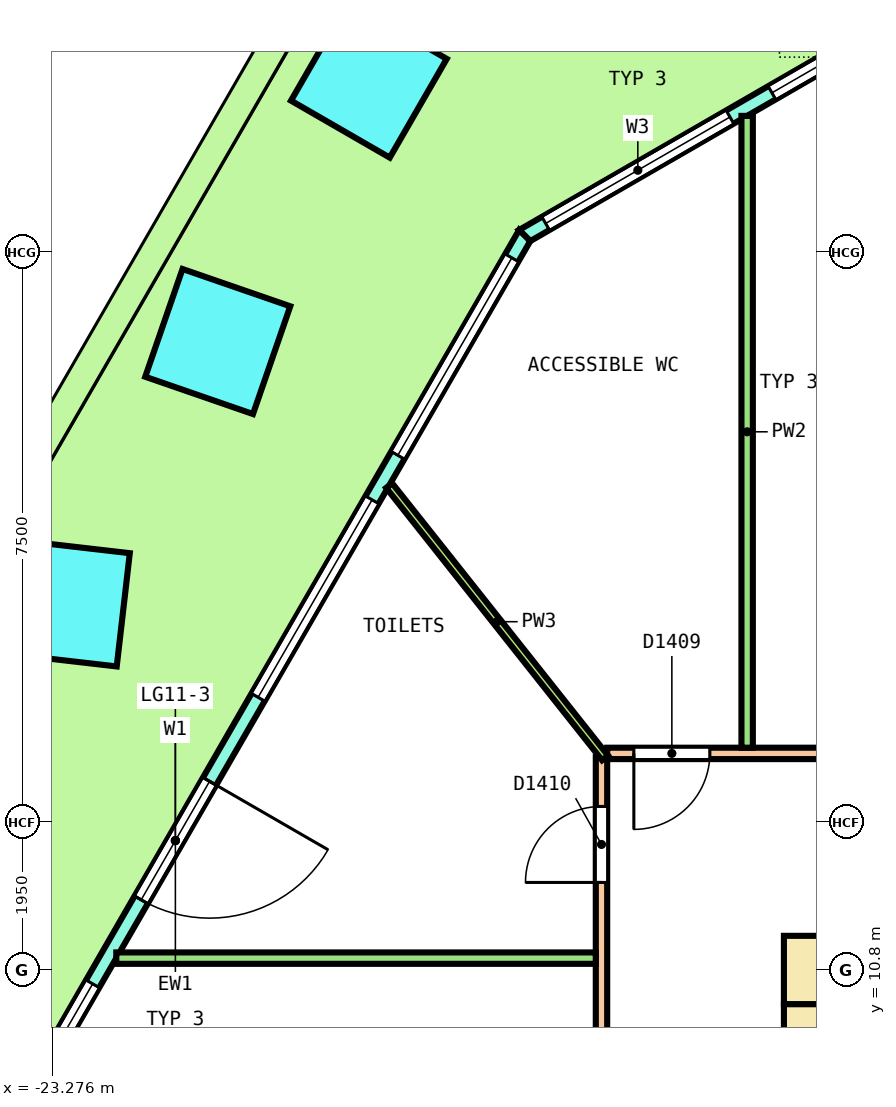
"""IFC4 building model, lengths in metres.
Left out: names, types, materials, properties, quantities, classifications, styles, units other than length and angle.
Written with IfcOpenShell. Run it as: python <this file> out.ifc"""

import sys

from ifc_helpers import new_model, si_unit, direction, frame, frame_2d, origin, origin_2d, place, context, subcontext, project, spatial, polyline, rectangle, outline, extrude, element, fill, save


model = new_model("IFC4")
c1 = context("Model", 3, precision=1e-05, world=origin(), true_north=direction((0.0, 1.0)))
c2 = subcontext(c1, "Body", "Model", "MODEL_VIEW")
j1 = project(units=[si_unit("LENGTHUNIT", "METRE"), si_unit("PLANEANGLEUNIT", "RADIAN")], contexts=[c1])
p1 = place(None, origin())
s1 = spatial("IfcSite", under=j1, at=p1, CompositionType="ELEMENT")
p2 = place(p1, origin())
s2 = spatial("IfcBuilding", under=s1, at=p2, CompositionType="ELEMENT")
p3 = place(p2, frame((0.0, 0.0, 49.8)))
s3 = spatial("IfcBuildingStorey", under=s2, at=p3, CompositionType="ELEMENT", Elevation=49.8)
p4 = place(p3, frame((-19.11, 22.512, 0.0), z_axis=(-0.036205074038, 0.0, 0.999344381389), x_axis=(-0.499425957592, -0.866167613071, -0.018093616283)))
e1 = element("IfcColumn", 1, at=p4, inside=s3, PredefinedType="COLUMN", context=c2, shape_type="SweptSolid", body=[
    extrude(rectangle(XDim=1.5, YDim=1.5, at=origin_2d()), origin(), (0.0, 0.0, 1.0), 4.053),
])
p5 = place(p3, frame((-21.098, 19.069, 0.0), z_axis=(-0.032654174822, 0.006325993277, 0.999446690262), x_axis=(-0.500478631698, -0.865680616164, -0.010872442804)))
e2 = element("IfcColumn", 2, at=p5, inside=s3, PredefinedType="COLUMN", context=c2, shape_type="SweptSolid", body=[
    extrude(rectangle(XDim=1.5, YDim=1.5, at=origin_2d()), origin(), (0.0, 0.0, 1.0), 4.052),
])
p6 = place(p3, frame((-23.087, 15.625, 0.0), z_axis=(-0.028980660531, 0.012532177527, 0.999501408624), x_axis=(-0.499450496938, -0.866334867635, -0.003619147421)))
e3 = element("IfcColumn", 3, at=p6, inside=s3, PredefinedType="COLUMN", context=c2, shape_type="SweptSolid", body=[
    extrude(rectangle(XDim=1.5, YDim=1.5, at=origin_2d()), origin(), (0.0, 0.0, 1.0), 4.052),
])
p7 = place(p3, frame((-11.107, 23.9, 0.0), z_axis=(0.0, 0.0, 1.0), x_axis=(-0.866029458321, -0.49999297727, 0.0)))
e4 = element("IfcWall", 4, at=p7, inside=s3, PredefinedType="SOLIDWALL", context=c2, shape_type="SweptSolid", body=[
    extrude(outline(polyline([(-0.027, -0.1), (1.128, -0.1), (2.282, -0.1), (3.437, -0.1), (4.592, -0.1), (5.747, -0.1), (6.901, -0.1), (6.848, 0.1), (5.711, 0.1), (4.574, 0.1), (3.437, 0.1), (2.301, 0.1), (1.164, 0.1), (0.027, 0.1), (-0.027, -0.1)])), origin(), (0.0, 0.0, 1.0), 4.1),
])
p8 = place(p7, frame((0.319, 0.0, 0.1)))
e5 = element("IfcOpeningElement", 5, at=p8, cuts=e4, PredefinedType="OPENING", context=c2, shape_type="SweptSolid", body=[
    extrude(rectangle(XDim=2.8, YDim=2.9, at=frame_2d((1.4, 1.45))), frame((0.0, 0.11, 0.0), z_axis=(0.0, -1.0, 0.0), x_axis=(1.0, 0.0, 0.0)), (0.0, 0.0, 1.0), 0.22),
])
p9 = place(p7, frame((3.756, 0.0, 0.1)))
e6 = element("IfcOpeningElement", 6, at=p9, cuts=e4, PredefinedType="OPENING", context=c2, shape_type="SweptSolid", body=[
    extrude(rectangle(XDim=2.8, YDim=2.9, at=frame_2d((1.4, 1.45))), frame((0.0, 0.11, 0.0), z_axis=(0.0, -1.0, 0.0), x_axis=(1.0, 0.0, 0.0)), (0.0, 0.0, 1.0), 0.22),
])
p10 = place(p3, frame((-17.061, 20.463, 0.0), z_axis=(0.0, 0.0, 1.0), x_axis=(-0.499998761798, -0.866026118659, 0.0)))
e7 = element("IfcWall", 7, at=p10, inside=s3, PredefinedType="SOLIDWALL", context=c2, shape_type="SweptSolid", body=[
    extrude(outline(polyline([(-0.027, -0.1), (0.997, -0.1), (2.021, -0.1), (3.046, -0.1), (4.07, -0.1), (5.094, -0.1), (6.118, -0.1), (7.143, -0.1), (8.167, -0.1), (9.191, -0.1), (10.215, -0.1), (11.239, -0.1), (12.263, -0.1), (13.288, -0.1), (14.312, -0.1), (15.336, -0.1), (16.36, -0.1), (17.385, -0.1), (18.409, -0.1), (18.355, 0.1), (17.337, 0.1), (16.319, 0.1), (15.3, 0.1), (14.282, 0.1), (13.264, 0.1), (12.246, 0.1), (11.227, 0.1), (10.209, 0.1), (9.191, 0.1), (8.173, 0.1), (7.155, 0.1), (6.136, 0.1), (5.118, 0.1), (4.1, 0.1), (3.082, 0.1), (2.063, 0.1), (1.045, 0.1), (0.027, 0.1), (-0.027, -0.1)])), origin(), (0.0, 0.0, 1.0), 4.1),
])
p11 = place(p10, frame((0.338, 0.0, 0.1)))
e8 = element("IfcOpeningElement", 8, at=p11, cuts=e7, PredefinedType="OPENING", context=c2, shape_type="SweptSolid", body=[
    extrude(rectangle(XDim=3.0, YDim=2.9, at=frame_2d((1.5, 1.45))), frame((0.0, 0.11, 0.0), z_axis=(0.0, -1.0, 0.0), x_axis=(1.0, 0.0, 0.0)), (0.0, 0.0, 1.0), 0.22),
])
p12 = place(p10, frame((4.015, 0.0, 0.1)))
e9 = element("IfcOpeningElement", 9, at=p12, cuts=e7, PredefinedType="OPENING", context=c2, shape_type="SweptSolid", body=[
    extrude(rectangle(XDim=3.0, YDim=2.9, at=frame_2d((1.5, 1.45))), frame((0.0, 0.11, 0.0), z_axis=(0.0, -1.0, 0.0), x_axis=(1.0, 0.0, 0.0)), (0.0, 0.0, 1.0), 0.22),
])
p13 = place(p10, frame((8.291, 0.0, 0.0)))
e10 = element("IfcOpeningElement", 10, at=p13, cuts=e7, PredefinedType="OPENING", context=c2, shape_type="SweptSolid", body=[
    extrude(rectangle(XDim=1.8, YDim=2.4, at=frame_2d((0.9, 1.2))), frame((0.0, 0.11, 0.0), z_axis=(0.0, -1.0, 0.0), x_axis=(1.0, 0.0, 0.0)), (0.0, 0.0, 1.0), 0.22),
])
p14 = place(p10, frame((8.291, 0.0, 2.55)))
e11 = element("IfcOpeningElement", 11, at=p14, cuts=e7, PredefinedType="OPENING", context=c2, shape_type="SweptSolid", body=[
    extrude(rectangle(XDim=1.8, YDim=0.45, at=frame_2d((0.9, 0.225))), frame((0.0, 0.11, 0.0), z_axis=(0.0, -1.0, 0.0), x_axis=(1.0, 0.0, 0.0)), (0.0, 0.0, 1.0), 0.22),
])
p15 = place(p10, frame((11.367, 0.0, 0.1)))
e12 = element("IfcOpeningElement", 12, at=p15, cuts=e7, PredefinedType="OPENING", context=c2, shape_type="SweptSolid", body=[
    extrude(rectangle(XDim=3.0, YDim=2.9, at=frame_2d((1.5, 1.45))), frame((0.0, 0.11, 0.0), z_axis=(0.0, -1.0, 0.0), x_axis=(1.0, 0.0, 0.0)), (0.0, 0.0, 1.0), 0.22),
])
p16 = place(p10, frame((15.044, 0.0, 0.1)))
e13 = element("IfcOpeningElement", 13, at=p16, cuts=e7, PredefinedType="OPENING", context=c2, shape_type="SweptSolid", body=[
    extrude(rectangle(XDim=3.0, YDim=2.9, at=frame_2d((1.5, 1.45))), frame((0.0, 0.11, 0.0), z_axis=(0.0, -1.0, 0.0), x_axis=(1.0, 0.0, 0.0)), (0.0, 0.0, 1.0), 0.22),
])
p17 = place(p3, frame((-13.65, 10.8, 0.0), z_axis=(0.0, 0.0, 1.0), x_axis=(1.0, 0.0, 0.0)))
e14 = element("IfcWall", 14, at=p17, inside=s3, PredefinedType="SHEAR", context=c2, shape_type="SweptSolid", body=[
    extrude(rectangle(XDim=27.3, YDim=0.9, at=frame_2d((13.65, 0.0))), origin(), (0.0, 0.0, 1.0), 4.1),
])
p18 = place(p17, frame((2.4, 0.0, 0.0)))
e15 = element("IfcOpeningElement", 15, at=p18, cuts=e14, PredefinedType="OPENING", context=c2, shape_type="SweptSolid", body=[
    extrude(rectangle(XDim=1.0, YDim=2.1, at=frame_2d((0.5, 1.05))), frame((0.0, 0.46, 0.0), z_axis=(0.0, -1.0, 0.0), x_axis=(1.0, 0.0, 0.0)), (0.0, 0.0, 1.0), 0.92),
])
p19 = place(p17, frame((6.494, 0.0, 0.0)))
e16 = element("IfcOpeningElement", 16, at=p19, cuts=e14, PredefinedType="OPENING", context=c2, shape_type="SweptSolid", body=[
    extrude(rectangle(XDim=1.0, YDim=2.1, at=frame_2d((0.5, 1.05))), frame((0.0, 0.46, 0.0), z_axis=(0.0, -1.0, 0.0), x_axis=(1.0, 0.0, 0.0)), (0.0, 0.0, 1.0), 0.92),
])
p20 = place(p17, frame((10.556, 0.0, 0.0)))
e17 = element("IfcOpeningElement", 17, at=p20, cuts=e14, PredefinedType="OPENING", context=c2, shape_type="SweptSolid", body=[
    extrude(rectangle(XDim=1.0, YDim=2.1, at=frame_2d((0.5, 1.05))), frame((0.0, 0.46, 0.0), z_axis=(0.0, -1.0, 0.0), x_axis=(1.0, 0.0, 0.0)), (0.0, 0.0, 1.0), 0.92),
])
p21 = place(p17, frame((18.077, 0.0, 0.0)))
e18 = element("IfcOpeningElement", 18, at=p21, cuts=e14, PredefinedType="OPENING", context=c2, shape_type="SweptSolid", body=[
    extrude(rectangle(XDim=1.0, YDim=2.1, at=frame_2d((0.5, 1.05))), frame((0.0, 0.46, 0.0), z_axis=(0.0, -1.0, 0.0), x_axis=(1.0, 0.0, 0.0)), (0.0, 0.0, 1.0), 0.92),
])
p22 = place(p17, frame((21.206, 0.0, 0.0)))
e19 = element("IfcOpeningElement", 19, at=p22, cuts=e14, PredefinedType="OPENING", context=c2, shape_type="SweptSolid", body=[
    extrude(rectangle(XDim=1.0, YDim=2.1, at=frame_2d((0.5, 1.05))), frame((0.0, 0.46, 0.0), z_axis=(0.0, -1.0, 0.0), x_axis=(1.0, 0.0, 0.0)), (0.0, 0.0, 1.0), 0.92),
])
p23 = place(p17, frame((24.367, 0.0, 0.0)))
e20 = element("IfcOpeningElement", 20, at=p23, cuts=e14, PredefinedType="OPENING", context=c2, shape_type="SweptSolid", body=[
    extrude(rectangle(XDim=1.0, YDim=2.1, at=frame_2d((0.5, 1.05))), frame((0.0, 0.46, 0.0), z_axis=(0.0, -1.0, 0.0), x_axis=(1.0, 0.0, 0.0)), (0.0, 0.0, 1.0), 0.92),
])
p24 = place(p17, frame((14.575, 0.0, 0.0)))
e21 = element("IfcOpeningElement", 21, at=p24, cuts=e14, PredefinedType="OPENING", context=c2, shape_type="SweptSolid", body=[
    extrude(rectangle(XDim=1.4, YDim=2.1, at=frame_2d((0.7, 1.05))), frame((0.0, 0.46, 0.0), z_axis=(0.0, -1.0, 0.0), x_axis=(1.0, 0.0, 0.0)), (0.0, 0.0, 1.0), 0.92),
])
p25 = place(p3, frame((-13.2, -10.35, 0.0), z_axis=(0.0, 0.0, 1.0), x_axis=(0.0, 1.0, 0.0)))
e22 = element("IfcWall", 22, at=p25, inside=s3, PredefinedType="SHEAR", context=c2, shape_type="SweptSolid", body=[
    extrude(rectangle(XDim=20.7, YDim=0.9, at=frame_2d((10.35, 0.0))), origin(), (0.0, 0.0, 1.0), 4.1),
])
p26 = place(p25, frame((9.15, 0.0, 0.0)))
e23 = element("IfcOpeningElement", 23, at=p26, cuts=e22, PredefinedType="OPENING", context=c2, shape_type="SweptSolid", body=[
    extrude(rectangle(XDim=2.4, YDim=2.1, at=frame_2d((1.2, 1.05))), frame((0.0, 0.46, 0.0), z_axis=(0.0, -1.0, 0.0), x_axis=(1.0, 0.0, 0.0)), (0.0, 0.0, 1.0), 0.92),
])
p27 = place(p25, frame((16.05, 0.0, 0.0)))
e24 = element("IfcOpeningElement", 24, at=p27, cuts=e22, PredefinedType="OPENING", context=c2, shape_type="SweptSolid", body=[
    extrude(rectangle(XDim=1.2, YDim=2.1, at=frame_2d((0.6, 1.05))), frame((0.0, 0.46, 0.0), z_axis=(0.0, -1.0, 0.0), x_axis=(1.0, 0.0, 0.0)), (0.0, 0.0, 1.0), 0.92),
])
p28 = place(p25, frame((3.45, 0.0, 0.0)))
e25 = element("IfcOpeningElement", 25, at=p28, cuts=e22, PredefinedType="OPENING", context=c2, shape_type="SweptSolid", body=[
    extrude(rectangle(XDim=1.2, YDim=2.1, at=frame_2d((0.6, 1.05))), frame((0.0, 0.46, 0.0), z_axis=(0.0, -1.0, 0.0), x_axis=(1.0, 0.0, 0.0)), (0.0, 0.0, 1.0), 0.92),
])
p29 = place(p3, frame((-15.975, 13.65, 0.0), z_axis=(0.0, 0.0, 1.0), x_axis=(1.0, 0.0, 0.0)))
e26 = element("IfcWall", 26, at=p29, inside=s3, PredefinedType="PARTITIONING", context=c2, shape_type="SweptSolid", body=[
    extrude(rectangle(XDim=31.95, YDim=0.15, at=frame_2d((15.975, 0.0))), origin(), (0.0, 0.0, 1.0), 3.05),
])
p30 = place(p29, frame((28.967, 0.0, 0.0)))
e27 = element("IfcOpeningElement", 27, at=p30, cuts=e26, PredefinedType="OPENING", context=c2, shape_type="SweptSolid", body=[
    extrude(rectangle(XDim=1.2, YDim=2.1, at=frame_2d((0.6, 1.05))), frame((0.0, 0.085, 0.0), z_axis=(0.0, -1.0, 0.0), x_axis=(1.0, 0.0, 0.0)), (0.0, 0.0, 1.0), 0.17),
])
p31 = place(p29, frame((13.623, 0.0, 0.0)))
e28 = element("IfcOpeningElement", 28, at=p31, cuts=e26, PredefinedType="OPENING", context=c2, shape_type="SweptSolid", body=[
    extrude(rectangle(XDim=1.2, YDim=2.1, at=frame_2d((0.6, 1.05))), frame((0.0, 0.085, 0.0), z_axis=(0.0, -1.0, 0.0), x_axis=(1.0, 0.0, 0.0)), (0.0, 0.0, 1.0), 0.17),
])
p32 = place(p29, frame((6.356, 0.0, 0.0)))
e29 = element("IfcOpeningElement", 29, at=p32, cuts=e26, PredefinedType="OPENING", context=c2, shape_type="SweptSolid", body=[
    extrude(rectangle(XDim=1.2, YDim=2.1, at=frame_2d((0.6, 1.05))), frame((0.0, 0.085, 0.0), z_axis=(0.0, -1.0, 0.0), x_axis=(1.0, 0.0, 0.0)), (0.0, 0.0, 1.0), 0.17),
])
p33 = place(p29, frame((0.351, 0.0, 0.0)))
e30 = element("IfcOpeningElement", 30, at=p33, cuts=e26, PredefinedType="OPENING", context=c2, shape_type="SweptSolid", body=[
    extrude(rectangle(XDim=1.0, YDim=2.1, at=frame_2d((0.5, 1.05))), frame((0.0, 0.085, 0.0), z_axis=(0.0, -1.0, 0.0), x_axis=(1.0, 0.0, 0.0)), (0.0, 0.0, 1.0), 0.17),
])
p34 = place(p3, frame((-16.05, -13.575, 0.0), z_axis=(0.0, 0.0, 1.0), x_axis=(0.0, 1.0, 0.0)))
e31 = element("IfcWall", 31, at=p34, inside=s3, PredefinedType="PARTITIONING", context=c2, shape_type="SweptSolid", body=[
    extrude(rectangle(XDim=27.175, YDim=0.15, at=frame_2d((13.587, 0.0))), origin(), (0.0, 0.0, 1.0), 3.05),
])
p35 = place(p34, frame((25.527, 0.0, 0.0)))
e32 = element("IfcOpeningElement", 32, at=p35, cuts=e31, PredefinedType="OPENING", context=c2, shape_type="SweptSolid", body=[
    extrude(rectangle(XDim=1.0, YDim=2.1, at=frame_2d((0.5, 1.05))), frame((0.0, 0.085, 0.0), z_axis=(0.0, -1.0, 0.0), x_axis=(1.0, 0.0, 0.0)), (0.0, 0.0, 1.0), 0.17),
])
p36 = place(p34, frame((18.987, 0.0, 0.0)))
e33 = element("IfcOpeningElement", 33, at=p36, cuts=e31, PredefinedType="OPENING", context=c2, shape_type="SweptSolid", body=[
    extrude(rectangle(XDim=1.2, YDim=2.1, at=frame_2d((0.6, 1.05))), frame((0.0, 0.085, 0.0), z_axis=(0.0, -1.0, 0.0), x_axis=(1.0, 0.0, 0.0)), (0.0, 0.0, 1.0), 0.17),
])
p37 = place(p34, frame((7.319, 0.0, 0.0)))
e34 = element("IfcOpeningElement", 34, at=p37, cuts=e31, PredefinedType="OPENING", context=c2, shape_type="SweptSolid", body=[
    extrude(rectangle(XDim=1.2, YDim=2.1, at=frame_2d((0.6, 1.05))), frame((0.0, 0.085, 0.0), z_axis=(0.0, -1.0, 0.0), x_axis=(1.0, 0.0, 0.0)), (0.0, 0.0, 1.0), 0.17),
])
p38 = place(p3, frame((-14.134, 13.725, 0.0), z_axis=(0.0, 0.0, 1.0), x_axis=(0.0, 1.0, 0.0)))
e35 = element("IfcWall", 35, at=p38, inside=s3, PredefinedType="PARTITIONING", context=c2, shape_type="SweptSolid", body=[
    extrude(rectangle(XDim=8.312, YDim=0.15, at=frame_2d((4.156, 0.0))), origin(), (0.0, 0.0, 1.0), 3.05),
])
p39 = place(p3, frame((-22.433, 10.957, 0.0), z_axis=(0.0, 0.0, 1.0), x_axis=(1.0, 0.0, 0.0)))
e36 = element("IfcWall", 36, at=p39, inside=s3, PredefinedType="PARTITIONING", context=c2, shape_type="SweptSolid", body=[
    extrude(rectangle(XDim=6.308, YDim=0.15, at=frame_2d((3.154, 0.0))), origin(), (0.0, 0.0, 1.0), 3.05),
])
p40 = place(p3, frame((-18.844, 17.174, 0.0), z_axis=(0.0, 0.0, 1.0), x_axis=(0.621211587881, -0.783642879813, 0.0)))
e37 = element("IfcWall", 37, at=p40, inside=s3, PredefinedType="PARTITIONING", context=c2, shape_type="SweptSolid", body=[
    extrude(rectangle(XDim=4.572, YDim=0.1, at=frame_2d((2.286, 0.0))), origin(), (0.0, 0.0, 1.0), 3.05),
])
p41 = place(p8, origin())
e38 = element("IfcWindow", 38, at=p41, inside=s3, PartitioningType="SINGLE_PANEL", PredefinedType="WINDOW", context=c2, shape_type="SweptSolid", body=[
    extrude(rectangle(XDim=2.8, YDim=2.9, at=frame_2d((1.4, 1.45))), frame((0.0, 0.03, 0.0), z_axis=(0.0, -1.0, 0.0), x_axis=(1.0, 0.0, 0.0)), (0.0, 0.0, 1.0), 0.06),
])
fill(e5, e38)
p42 = place(p9, origin())
e39 = element("IfcWindow", 39, at=p42, inside=s3, PartitioningType="SINGLE_PANEL", PredefinedType="WINDOW", context=c2, shape_type="SweptSolid", body=[
    extrude(rectangle(XDim=2.8, YDim=2.9, at=frame_2d((1.4, 1.45))), frame((0.0, 0.03, 0.0), z_axis=(0.0, -1.0, 0.0), x_axis=(1.0, 0.0, 0.0)), (0.0, 0.0, 1.0), 0.06),
])
fill(e6, e39)
p43 = place(p11, origin())
e40 = element("IfcWindow", 40, at=p43, inside=s3, PartitioningType="SINGLE_PANEL", PredefinedType="WINDOW", context=c2, shape_type="SweptSolid", body=[
    extrude(rectangle(XDim=3.0, YDim=2.9, at=frame_2d((1.5, 1.45))), frame((0.0, 0.03, 0.0), z_axis=(0.0, -1.0, 0.0), x_axis=(1.0, 0.0, 0.0)), (0.0, 0.0, 1.0), 0.06),
])
fill(e8, e40)
p44 = place(p12, origin())
e41 = element("IfcWindow", 41, at=p44, inside=s3, PartitioningType="SINGLE_PANEL", PredefinedType="WINDOW", context=c2, shape_type="SweptSolid", body=[
    extrude(rectangle(XDim=3.0, YDim=2.9, at=frame_2d((1.5, 1.45))), frame((0.0, 0.03, 0.0), z_axis=(0.0, -1.0, 0.0), x_axis=(1.0, 0.0, 0.0)), (0.0, 0.0, 1.0), 0.06),
])
fill(e9, e41)
p45 = place(p13, origin())
e42 = element("IfcDoor", 42, at=p45, inside=s3, OperationType="DOUBLE_DOOR_SINGLE_SWING", PredefinedType="DOOR", context=c2, shape_type="SweptSolid", body=[
    extrude(rectangle(XDim=1.8, YDim=2.4, at=frame_2d((0.9, 1.2))), frame((0.0, 0.025, 0.0), z_axis=(0.0, -1.0, 0.0), x_axis=(1.0, 0.0, 0.0)), (0.0, 0.0, 1.0), 0.05),
])
fill(e10, e42)
p46 = place(p14, origin())
e43 = element("IfcWindow", 43, at=p46, inside=s3, PartitioningType="SINGLE_PANEL", PredefinedType="WINDOW", context=c2, shape_type="SweptSolid", body=[
    extrude(rectangle(XDim=1.8, YDim=0.45, at=frame_2d((0.9, 0.225))), frame((0.0, 0.03, 0.0), z_axis=(0.0, -1.0, 0.0), x_axis=(1.0, 0.0, 0.0)), (0.0, 0.0, 1.0), 0.06),
])
fill(e11, e43)
p47 = place(p15, origin())
e44 = element("IfcWindow", 44, at=p47, inside=s3, PartitioningType="SINGLE_PANEL", PredefinedType="WINDOW", context=c2, shape_type="SweptSolid", body=[
    extrude(rectangle(XDim=3.0, YDim=2.9, at=frame_2d((1.5, 1.45))), frame((0.0, 0.03, 0.0), z_axis=(0.0, -1.0, 0.0), x_axis=(1.0, 0.0, 0.0)), (0.0, 0.0, 1.0), 0.06),
])
fill(e12, e44)
p48 = place(p33, origin())
e45 = element("IfcDoor", 45, at=p48, inside=s3, OperationType="SINGLE_SWING_LEFT", PredefinedType="DOOR", context=c2, shape_type="SweptSolid", body=[
    extrude(rectangle(XDim=1.0, YDim=2.1, at=frame_2d((0.5, 1.05))), frame((0.0, 0.025, 0.0), z_axis=(0.0, -1.0, 0.0), x_axis=(1.0, 0.0, 0.0)), (0.0, 0.0, 1.0), 0.05),
])
fill(e30, e45)
p49 = place(p35, origin())
e46 = element("IfcDoor", 46, at=p49, inside=s3, OperationType="SINGLE_SWING_RIGHT", PredefinedType="DOOR", context=c2, shape_type="SweptSolid", body=[
    extrude(rectangle(XDim=1.0, YDim=2.1, at=frame_2d((0.5, 1.05))), frame((0.0, 0.025, 0.0), z_axis=(0.0, -1.0, 0.0), x_axis=(1.0, 0.0, 0.0)), (0.0, 0.0, 1.0), 0.05),
])
fill(e32, e46)
save(model, sys.argv[1])
